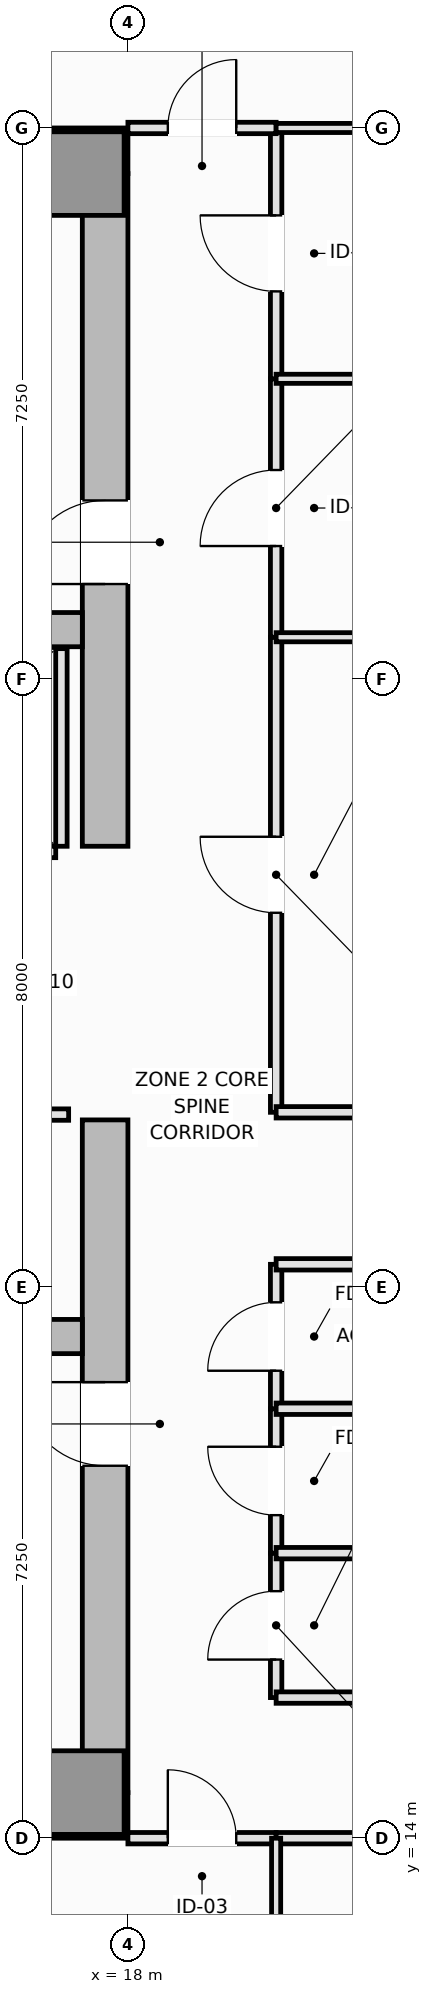
"""IFC4 building model, lengths in metres.
Left out: names, types, materials, properties, quantities, classifications, styles, units other than length and angle.
Written with IfcOpenShell. Run it as: python <this file> out.ifc"""

import sys

from ifc_helpers import new_model, si_unit, direction, frame, frame_2d, origin, origin_2d, place, context, subcontext, project, spatial, rectangle, extrude, element, fill, save


model = new_model("IFC4")
c1 = context("Model", 3, precision=1e-05, world=origin(), true_north=direction((0.0, 1.0)))
c2 = subcontext(c1, "Body", "Model", "MODEL_VIEW")
j1 = project(units=[si_unit("LENGTHUNIT", "METRE"), si_unit("PLANEANGLEUNIT", "RADIAN")], contexts=[c1])
p1 = place(None, origin())
s1 = spatial("IfcSite", under=j1, at=p1, CompositionType="ELEMENT")
p2 = place(p1, origin())
s2 = spatial("IfcBuilding", under=s1, at=p2, CompositionType="ELEMENT")
p3 = place(p2, frame((0.0, 0.0, 134.2)))
s3 = spatial("IfcBuildingStorey", under=s2, at=p3, CompositionType="ELEMENT", Elevation=134.2)
for number, where, z_axis, x_axis in (
    (1, (4.5, 14.3, 0.0), (0.0, 0.0, 1.0), (1.0, 0.0, 0.0)),
    (2, (4.5, 36.2, 0.0), (0.0, 0.0, 1.0), (1.0, 0.0, 0.0)),
):
    element("IfcWall", number, at=place(p3, frame(where, z_axis=z_axis, x_axis=x_axis)), inside=s3, PredefinedType="SHEAR", context=c2, shape_type="SweptSolid", body=[
        extrude(rectangle(XDim=13.5, YDim=0.6, at=frame_2d((6.75, 0.0))), origin(), (0.0, 0.0, 1.0), 3.55),
    ])
p4 = place(p3, frame((17.7, 14.6, 0.0), z_axis=(0.0, 0.0, 1.0), x_axis=(0.0, 1.0, 0.0)))
e3 = element("IfcWall", 3, at=p4, inside=s3, PredefinedType="SHEAR", context=c2, shape_type="SweptSolid", body=[
    extrude(rectangle(XDim=8.85, YDim=0.6, at=frame_2d((4.425, 0.0))), origin(), (0.0, 0.0, 1.0), 3.55),
])
p5 = place(p4, frame((4.3, 0.0, 0.0)))
e4 = element("IfcOpeningElement", 4, at=p5, cuts=e3, PredefinedType="OPENING", context=c2, shape_type="SweptSolid", body=[
    extrude(rectangle(XDim=1.1, YDim=2.15, at=frame_2d((0.55, 1.075))), frame((0.0, 0.31, 0.0), z_axis=(0.0, -1.0, 0.0), x_axis=(1.0, 0.0, 0.0)), (0.0, 0.0, 1.0), 0.62),
])
p6 = place(p3, frame((17.7, 27.05, 0.0), z_axis=(0.0, 0.0, 1.0), x_axis=(0.0, 1.0, 0.0)))
e5 = element("IfcWall", 5, at=p6, inside=s3, PredefinedType="SHEAR", context=c2, shape_type="SweptSolid", body=[
    extrude(rectangle(XDim=8.85, YDim=0.6, at=frame_2d((4.425, 0.0))), origin(), (0.0, 0.0, 1.0), 3.55),
])
p7 = place(p6, frame((3.45, 0.0, 0.0)))
e6 = element("IfcOpeningElement", 6, at=p7, cuts=e5, PredefinedType="OPENING", context=c2, shape_type="SweptSolid", body=[
    extrude(rectangle(XDim=1.1, YDim=2.15, at=frame_2d((0.55, 1.075))), frame((0.0, 0.31, 0.0), z_axis=(0.0, -1.0, 0.0), x_axis=(1.0, 0.0, 0.0)), (0.0, 0.0, 1.0), 0.62),
])
for number, where, z_axis, x_axis in (
    (7, (5.1, 20.6, 0.0), (0.0, 0.0, 1.0), (1.0, 0.0, 0.0)),
    (8, (5.1, 29.9, 0.0), (0.0, 0.0, 1.0), (1.0, 0.0, 0.0)),
):
    element("IfcWall", number, at=place(p3, frame(where, z_axis=z_axis, x_axis=x_axis)), inside=s3, PredefinedType="SHEAR", context=c2, shape_type="SweptSolid", body=[
        extrude(rectangle(XDim=12.3, YDim=0.45, at=frame_2d((6.15, 0.0))), origin(), (0.0, 0.0, 1.0), 3.55),
    ])
for number, where, z_axis, x_axis in (
    (9, (17.4, 14.6, 0.0), (0.0, 0.0, 1.0), (1.0, 0.0, 0.0)),
    (10, (17.4, 35.9, 0.0), (0.0, 0.0, 1.0), (1.0, 0.0, 0.0)),
):
    element("IfcColumn", number, at=place(p3, frame(where, z_axis=z_axis, x_axis=x_axis)), inside=s3, PredefinedType="PILASTER", context=c2, shape_type="SweptSolid", body=[
        extrude(rectangle(XDim=1.1, YDim=1.1, at=origin_2d()), origin(), (0.0, 0.0, 1.0), 3.55),
    ])
p8 = place(p3, frame((14.5, 26.975, 0.0), z_axis=(0.0, 0.0, 1.0), x_axis=(1.0, 0.0, 0.0)))
e11 = element("IfcWall", 11, at=p8, inside=s3, PredefinedType="PARTITIONING", context=c2, shape_type="SweptSolid", body=[
    extrude(rectangle(XDim=2.55, YDim=0.15, at=frame_2d((1.275, 0.0))), origin(), (0.0, 0.0, 1.0), 3.37),
])
p9 = place(p8, frame((0.625, 0.0, 0.0)))
e12 = element("IfcOpeningElement", 12, at=p9, cuts=e11, PredefinedType="OPENING", context=c2, shape_type="SweptSolid", body=[
    extrude(rectangle(XDim=1.3, YDim=2.2, at=frame_2d((0.65, 1.1))), frame((0.0, 0.085, 0.0), z_axis=(0.0, -1.0, 0.0), x_axis=(1.0, 0.0, 0.0)), (0.0, 0.0, 1.0), 0.17),
])
p10 = place(p3, frame((17.125, 27.05, 0.0), z_axis=(0.0, 0.0, 1.0), x_axis=(0.0, 1.0, 0.0)))
e13 = element("IfcWall", 13, at=p10, inside=s3, PredefinedType="PARTITIONING", context=c2, shape_type="SweptSolid", body=[
    extrude(rectangle(XDim=2.6, YDim=0.15, at=frame_2d((1.3, 0.0))), origin(), (0.0, 0.0, 1.0), 3.37),
])
p11 = place(p3, frame((14.33, 23.52, 0.0), z_axis=(0.0, 0.0, 1.0), x_axis=(1.0, 0.0, 0.0)))
e14 = element("IfcWall", 14, at=p11, inside=s3, PredefinedType="PARTITIONING", context=c2, shape_type="SweptSolid", body=[
    extrude(rectangle(XDim=2.89, YDim=0.15, at=frame_2d((1.445, 0.0))), origin(), (0.0, 0.0, 1.0), 3.37),
])
p12 = place(p11, frame((0.28, 0.0, 0.0)))
e15 = element("IfcOpeningElement", 15, at=p12, cuts=e14, PredefinedType="OPENING", context=c2, shape_type="SweptSolid", body=[
    extrude(rectangle(XDim=0.9, YDim=2.1, at=frame_2d((0.45, 1.05))), frame((0.0, 0.085, 0.0), z_axis=(0.0, -1.0, 0.0), x_axis=(1.0, 0.0, 0.0)), (0.0, 0.0, 1.0), 0.17),
])
p13 = place(p11, frame((1.71, 0.0, 0.0)))
e16 = element("IfcOpeningElement", 16, at=p13, cuts=e14, PredefinedType="OPENING", context=c2, shape_type="SweptSolid", body=[
    extrude(rectangle(XDim=0.9, YDim=2.1, at=frame_2d((0.45, 1.05))), frame((0.0, 0.085, 0.0), z_axis=(0.0, -1.0, 0.0), x_axis=(1.0, 0.0, 0.0)), (0.0, 0.0, 1.0), 0.17),
])
p14 = place(p3, frame((19.95, 15.85, 0.0), z_axis=(0.0, 0.0, 1.0), x_axis=(0.0, 1.0, 0.0)))
e17 = element("IfcWall", 17, at=p14, inside=s3, PredefinedType="PLUMBINGWALL", context=c2, shape_type="SweptSolid", body=[
    extrude(rectangle(XDim=1.9, YDim=0.15, at=frame_2d((0.95, 0.0))), origin(), (0.0, 0.0, 1.0), 3.37),
])
p15 = place(p14, frame((0.5, 0.0, 0.0)))
e18 = element("IfcOpeningElement", 18, at=p15, cuts=e17, PredefinedType="OPENING", context=c2, shape_type="SweptSolid", body=[
    extrude(rectangle(XDim=0.9, YDim=2.1, at=frame_2d((0.45, 1.05))), frame((0.0, 0.085, 0.0), z_axis=(0.0, -1.0, 0.0), x_axis=(1.0, 0.0, 0.0)), (0.0, 0.0, 1.0), 0.17),
])
p16 = place(p3, frame((19.95, 17.75, 0.0), z_axis=(0.0, 0.0, 1.0), x_axis=(0.0, 1.0, 0.0)))
e19 = element("IfcWall", 19, at=p16, inside=s3, PredefinedType="PLUMBINGWALL", context=c2, shape_type="SweptSolid", body=[
    extrude(rectangle(XDim=1.9, YDim=0.15, at=frame_2d((0.95, 0.0))), origin(), (0.0, 0.0, 1.0), 3.37),
])
p17 = place(p16, frame((0.5, 0.0, 0.0)))
e20 = element("IfcOpeningElement", 20, at=p17, cuts=e19, PredefinedType="OPENING", context=c2, shape_type="SweptSolid", body=[
    extrude(rectangle(XDim=0.9, YDim=2.1, at=frame_2d((0.45, 1.05))), frame((0.0, 0.085, 0.0), z_axis=(0.0, -1.0, 0.0), x_axis=(1.0, 0.0, 0.0)), (0.0, 0.0, 1.0), 0.17),
])
p18 = place(p3, frame((19.95, 19.65, 0.0), z_axis=(0.0, 0.0, 1.0), x_axis=(0.0, 1.0, 0.0)))
e21 = element("IfcWall", 21, at=p18, inside=s3, PredefinedType="PLUMBINGWALL", context=c2, shape_type="SweptSolid", body=[
    extrude(rectangle(XDim=1.9, YDim=0.15, at=frame_2d((0.95, 0.0))), origin(), (0.0, 0.0, 1.0), 3.37),
])
p19 = place(p18, frame((0.5, 0.0, 0.0)))
e22 = element("IfcOpeningElement", 22, at=p19, cuts=e21, PredefinedType="OPENING", context=c2, shape_type="SweptSolid", body=[
    extrude(rectangle(XDim=0.9, YDim=2.1, at=frame_2d((0.45, 1.05))), frame((0.0, 0.085, 0.0), z_axis=(0.0, -1.0, 0.0), x_axis=(1.0, 0.0, 0.0)), (0.0, 0.0, 1.0), 0.17),
])
p20 = place(p3, frame((19.95, 23.55, 0.0), z_axis=(0.0, 0.0, 1.0), x_axis=(0.0, 1.0, 0.0)))
e23 = element("IfcWall", 23, at=p20, inside=s3, PredefinedType="PARTITIONING", context=c2, shape_type="SweptSolid", body=[
    extrude(rectangle(XDim=6.25, YDim=0.15, at=frame_2d((3.125, 0.0))), origin(), (0.0, 0.0, 1.0), 3.37),
])
p21 = place(p20, frame((2.625, 0.0, 0.0)))
e24 = element("IfcOpeningElement", 24, at=p21, cuts=e23, PredefinedType="OPENING", context=c2, shape_type="SweptSolid", body=[
    extrude(rectangle(XDim=1.0, YDim=2.15, at=frame_2d((0.5, 1.075))), frame((0.0, 0.085, 0.0), z_axis=(0.0, -1.0, 0.0), x_axis=(1.0, 0.0, 0.0)), (0.0, 0.0, 1.0), 0.17),
])
p22 = place(p3, frame((19.95, 29.8, 0.0), z_axis=(0.0, 0.0, 1.0), x_axis=(0.0, 1.0, 0.0)))
e25 = element("IfcWall", 25, at=p22, inside=s3, PredefinedType="PARTITIONING", context=c2, shape_type="SweptSolid", body=[
    extrude(rectangle(XDim=3.4, YDim=0.15, at=frame_2d((1.7, 0.0))), origin(), (0.0, 0.0, 1.0), 3.37),
])
p23 = place(p22, frame((1.2, 0.0, 0.0)))
e26 = element("IfcOpeningElement", 26, at=p23, cuts=e25, PredefinedType="OPENING", context=c2, shape_type="SweptSolid", body=[
    extrude(rectangle(XDim=1.0, YDim=2.15, at=frame_2d((0.5, 1.075))), frame((0.0, 0.085, 0.0), z_axis=(0.0, -1.0, 0.0), x_axis=(1.0, 0.0, 0.0)), (0.0, 0.0, 1.0), 0.17),
])
p24 = place(p3, frame((19.95, 33.2, 0.0), z_axis=(0.0, 0.0, 1.0), x_axis=(0.0, 1.0, 0.0)))
e27 = element("IfcWall", 27, at=p24, inside=s3, PredefinedType="PARTITIONING", context=c2, shape_type="SweptSolid", body=[
    extrude(rectangle(XDim=3.3, YDim=0.15, at=frame_2d((1.65, 0.0))), origin(), (0.0, 0.0, 1.0), 3.37),
])
p25 = place(p24, frame((1.15, 0.0, 0.0)))
e28 = element("IfcOpeningElement", 28, at=p25, cuts=e27, PredefinedType="OPENING", context=c2, shape_type="SweptSolid", body=[
    extrude(rectangle(XDim=1.0, YDim=2.15, at=frame_2d((0.5, 1.075))), frame((0.0, 0.085, 0.0), z_axis=(0.0, -1.0, 0.0), x_axis=(1.0, 0.0, 0.0)), (0.0, 0.0, 1.0), 0.17),
])
p26 = place(p3, frame((18.0, 14.0, 0.0), z_axis=(0.0, 0.0, 1.0), x_axis=(1.0, 0.0, 0.0)))
e29 = element("IfcWall", 29, at=p26, inside=s3, PredefinedType="PARTITIONING", context=c2, shape_type="SweptSolid", body=[
    extrude(rectangle(XDim=1.95, YDim=0.15, at=frame_2d((0.975, 0.0))), origin(), (0.0, 0.0, 1.0), 3.37),
])
p27 = place(p26, frame((0.525, 0.0, 0.0)))
e30 = element("IfcOpeningElement", 30, at=p27, cuts=e29, PredefinedType="OPENING", context=c2, shape_type="SweptSolid", body=[
    extrude(rectangle(XDim=0.9, YDim=2.1, at=frame_2d((0.45, 1.05))), frame((0.0, 0.085, 0.0), z_axis=(0.0, -1.0, 0.0), x_axis=(1.0, 0.0, 0.0)), (0.0, 0.0, 1.0), 0.17),
])
p28 = place(p3, frame((18.0, 36.5, 0.0), z_axis=(0.0, 0.0, 1.0), x_axis=(1.0, 0.0, 0.0)))
e31 = element("IfcWall", 31, at=p28, inside=s3, PredefinedType="PARTITIONING", context=c2, shape_type="SweptSolid", body=[
    extrude(rectangle(XDim=1.95, YDim=0.15, at=frame_2d((0.975, 0.0))), origin(), (0.0, 0.0, 1.0), 3.37),
])
p29 = place(p28, frame((0.525, 0.0, 0.0)))
e32 = element("IfcOpeningElement", 32, at=p29, cuts=e31, PredefinedType="OPENING", context=c2, shape_type="SweptSolid", body=[
    extrude(rectangle(XDim=0.9, YDim=2.1, at=frame_2d((0.45, 1.05))), frame((0.0, 0.085, 0.0), z_axis=(0.0, -1.0, 0.0), x_axis=(1.0, 0.0, 0.0)), (0.0, 0.0, 1.0), 0.17),
])
p30 = place(p3, frame((19.95, 21.55, 0.0), z_axis=(0.0, 0.0, 1.0), x_axis=(1.0, 0.0, 0.0)))
e33 = element("IfcWall", 33, at=p30, inside=s3, PredefinedType="PLUMBINGWALL", context=c2, shape_type="SweptSolid", body=[
    extrude(rectangle(XDim=3.65, YDim=0.15, at=frame_2d((1.825, 0.0))), origin(), (0.0, 0.0, 1.0), 3.37),
])
p31 = place(p3, frame((19.95, 23.55, 0.0), z_axis=(0.0, 0.0, 1.0), x_axis=(1.0, 0.0, 0.0)))
e34 = element("IfcWall", 34, at=p31, inside=s3, PredefinedType="PARTITIONING", context=c2, shape_type="SweptSolid", body=[
    extrude(rectangle(XDim=7.55, YDim=0.15, at=frame_2d((3.775, 0.0))), origin(), (0.0, 0.0, 1.0), 3.37),
])
p32 = place(p3, frame((19.95, 15.85, 0.0), z_axis=(0.0, 0.0, 1.0), x_axis=(1.0, 0.0, 0.0)))
e35 = element("IfcWall", 35, at=p32, inside=s3, PredefinedType="PLUMBINGWALL", context=c2, shape_type="SweptSolid", body=[
    extrude(rectangle(XDim=3.65, YDim=0.15, at=frame_2d((1.825, 0.0))), origin(), (0.0, 0.0, 1.0), 3.37),
])
p33 = place(p3, frame((19.95, 14.0, 0.0), z_axis=(0.0, 0.0, 1.0), x_axis=(1.0, 0.0, 0.0)))
e36 = element("IfcWall", 36, at=p33, inside=s3, PredefinedType="PARTITIONING", context=c2, shape_type="SweptSolid", body=[
    extrude(rectangle(XDim=7.55, YDim=0.15, at=frame_2d((3.775, 0.0))), origin(), (0.0, 0.0, 1.0), 3.37),
])
p34 = place(p33, frame((3.275, 0.0, 0.0)))
e37 = element("IfcOpeningElement", 37, at=p34, cuts=e36, PredefinedType="OPENING", context=c2, shape_type="SweptSolid", body=[
    extrude(rectangle(XDim=1.0, YDim=2.15, at=frame_2d((0.5, 1.075))), frame((0.0, 0.085, 0.0), z_axis=(0.0, -1.0, 0.0), x_axis=(1.0, 0.0, 0.0)), (0.0, 0.0, 1.0), 0.17),
])
for number, where, z_axis, x_axis in (
    (38, (19.95, 17.75, 0.0), (0.0, 0.0, 1.0), (1.0, 0.0, 0.0)),
    (39, (19.95, 19.65, 0.0), (0.0, 0.0, 1.0), (1.0, 0.0, 0.0)),
):
    element("IfcWall", number, at=place(p3, frame(where, z_axis=z_axis, x_axis=x_axis)), inside=s3, PredefinedType="PLUMBINGWALL", context=c2, shape_type="SweptSolid", body=[
        extrude(rectangle(XDim=3.65, YDim=0.15, at=frame_2d((1.825, 0.0))), origin(), (0.0, 0.0, 1.0), 3.37),
    ])
for number, where, z_axis, x_axis in (
    (40, (19.95, 29.8, 0.0), (0.0, 0.0, 1.0), (1.0, 0.0, 0.0)),
    (41, (19.95, 33.2, 0.0), (0.0, 0.0, 1.0), (1.0, 0.0, 0.0)),
    (42, (19.95, 36.5, 0.0), (0.0, 0.0, 1.0), (1.0, 0.0, 0.0)),
):
    element("IfcWall", number, at=place(p3, frame(where, z_axis=z_axis, x_axis=x_axis)), inside=s3, PredefinedType="PARTITIONING", context=c2, shape_type="SweptSolid", body=[
        extrude(rectangle(XDim=7.55, YDim=0.12, at=frame_2d((3.775, 0.0))), origin(), (0.0, 0.0, 1.0), 3.37),
    ])
p35 = place(p3, frame((19.95, 3.51, 0.0), z_axis=(0.0, 0.0, 1.0), x_axis=(0.0, 1.0, 0.0)))
e43 = element("IfcWall", 43, at=p35, inside=s3, PredefinedType="PARTITIONING", context=c2, shape_type="SweptSolid", body=[
    extrude(rectangle(XDim=10.49, YDim=0.12, at=frame_2d((5.245, 0.0))), origin(), (0.0, 0.0, 1.0), 3.37),
])
p36 = place(p5, origin())
e44 = element("IfcDoor", 44, at=p36, inside=s3, OperationType="SINGLE_SWING_RIGHT", PredefinedType="DOOR", context=c2, shape_type="SweptSolid", body=[
    extrude(rectangle(XDim=1.1, YDim=2.15, at=frame_2d((0.55, 1.075))), frame((0.0, 0.025, 0.0), z_axis=(0.0, -1.0, 0.0), x_axis=(1.0, 0.0, 0.0)), (0.0, 0.0, 1.0), 0.05),
])
fill(e4, e44)
p37 = place(p7, origin())
e45 = element("IfcDoor", 45, at=p37, inside=s3, OperationType="SINGLE_SWING_LEFT", PredefinedType="DOOR", context=c2, shape_type="SweptSolid", body=[
    extrude(rectangle(XDim=1.1, YDim=2.15, at=frame_2d((0.55, 1.075))), frame((0.0, 0.025, 0.0), z_axis=(0.0, -1.0, 0.0), x_axis=(1.0, 0.0, 0.0)), (0.0, 0.0, 1.0), 0.05),
])
fill(e6, e45)
p38 = place(p15, origin())
e46 = element("IfcDoor", 46, at=p38, inside=s3, OperationType="SINGLE_SWING_LEFT", PredefinedType="DOOR", context=c2, shape_type="SweptSolid", body=[
    extrude(rectangle(XDim=0.9, YDim=2.1, at=frame_2d((0.45, 1.05))), frame((0.0, 0.025, 0.0), z_axis=(0.0, -1.0, 0.0), x_axis=(1.0, 0.0, 0.0)), (0.0, 0.0, 1.0), 0.05),
])
fill(e18, e46)
p39 = place(p17, origin())
e47 = element("IfcDoor", 47, at=p39, inside=s3, OperationType="SINGLE_SWING_RIGHT", PredefinedType="DOOR", context=c2, shape_type="SweptSolid", body=[
    extrude(rectangle(XDim=0.9, YDim=2.1, at=frame_2d((0.45, 1.05))), frame((0.0, 0.025, 0.0), z_axis=(0.0, -1.0, 0.0), x_axis=(1.0, 0.0, 0.0)), (0.0, 0.0, 1.0), 0.05),
])
fill(e20, e47)
p40 = place(p19, origin())
e48 = element("IfcDoor", 48, at=p40, inside=s3, OperationType="SINGLE_SWING_LEFT", PredefinedType="DOOR", context=c2, shape_type="SweptSolid", body=[
    extrude(rectangle(XDim=0.9, YDim=2.1, at=frame_2d((0.45, 1.05))), frame((0.0, 0.025, 0.0), z_axis=(0.0, -1.0, 0.0), x_axis=(1.0, 0.0, 0.0)), (0.0, 0.0, 1.0), 0.05),
])
fill(e22, e48)
p41 = place(p21, origin())
e49 = element("IfcDoor", 49, at=p41, inside=s3, OperationType="SINGLE_SWING_RIGHT", PredefinedType="DOOR", context=c2, shape_type="SweptSolid", body=[
    extrude(rectangle(XDim=1.0, YDim=2.15, at=frame_2d((0.5, 1.075))), frame((0.0, 0.025, 0.0), z_axis=(0.0, -1.0, 0.0), x_axis=(1.0, 0.0, 0.0)), (0.0, 0.0, 1.0), 0.05),
])
fill(e24, e49)
p42 = place(p23, origin())
e50 = element("IfcDoor", 50, at=p42, inside=s3, OperationType="SINGLE_SWING_LEFT", PredefinedType="DOOR", context=c2, shape_type="SweptSolid", body=[
    extrude(rectangle(XDim=1.0, YDim=2.15, at=frame_2d((0.5, 1.075))), frame((0.0, 0.025, 0.0), z_axis=(0.0, -1.0, 0.0), x_axis=(1.0, 0.0, 0.0)), (0.0, 0.0, 1.0), 0.05),
])
fill(e26, e50)
p43 = place(p25, origin())
e51 = element("IfcDoor", 51, at=p43, inside=s3, OperationType="SINGLE_SWING_RIGHT", PredefinedType="DOOR", context=c2, shape_type="SweptSolid", body=[
    extrude(rectangle(XDim=1.0, YDim=2.15, at=frame_2d((0.5, 1.075))), frame((0.0, 0.025, 0.0), z_axis=(0.0, -1.0, 0.0), x_axis=(1.0, 0.0, 0.0)), (0.0, 0.0, 1.0), 0.05),
])
fill(e28, e51)
p44 = place(p27, origin())
e52 = element("IfcDoor", 52, at=p44, inside=s3, OperationType="SINGLE_SWING_LEFT", PredefinedType="DOOR", context=c2, shape_type="SweptSolid", body=[
    extrude(rectangle(XDim=0.9, YDim=2.1, at=frame_2d((0.45, 1.05))), frame((0.0, 0.025, 0.0), z_axis=(0.0, -1.0, 0.0), x_axis=(1.0, 0.0, 0.0)), (0.0, 0.0, 1.0), 0.05),
])
fill(e30, e52)
p45 = place(p29, origin())
e53 = element("IfcDoor", 53, at=p45, inside=s3, OperationType="SINGLE_SWING_RIGHT", PredefinedType="DOOR", context=c2, shape_type="SweptSolid", body=[
    extrude(rectangle(XDim=0.9, YDim=2.1, at=frame_2d((0.45, 1.05))), frame((0.0, 0.025, 0.0), z_axis=(0.0, -1.0, 0.0), x_axis=(1.0, 0.0, 0.0)), (0.0, 0.0, 1.0), 0.05),
])
fill(e32, e53)
save(model, sys.argv[1])
